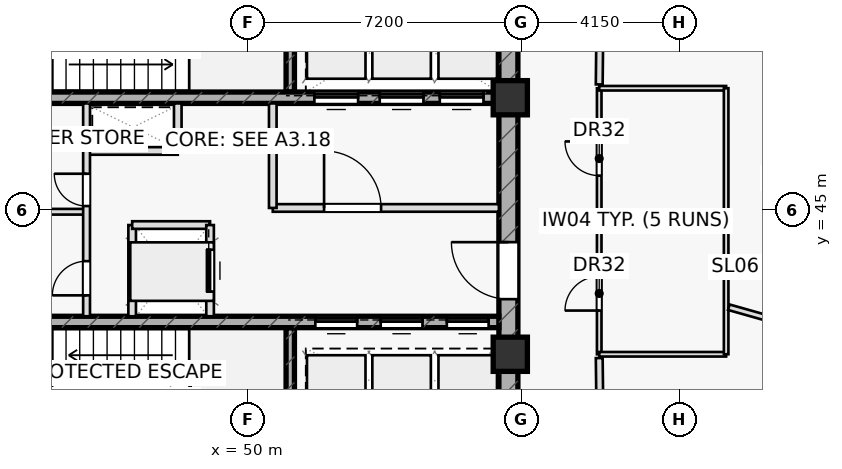
"""IFC4 building model, lengths in metres.
Left out: names, types, materials, properties, quantities, classifications, styles, units other than length and angle.
Written with IfcOpenShell. Run it as: python <this file> out.ifc"""

import sys

from ifc_helpers import new_model, si_unit, direction, frame, frame_2d, origin, origin_2d, place, context, subcontext, project, spatial, rectangle, extrude, element, fill, save


model = new_model("IFC4")
c1 = context("Model", 3, precision=1e-05, world=origin(), true_north=direction((0.0, 1.0)))
c2 = subcontext(c1, "Body", "Model", "MODEL_VIEW")
j1 = project(units=[si_unit("LENGTHUNIT", "METRE"), si_unit("PLANEANGLEUNIT", "RADIAN")], contexts=[c1])
p1 = place(None, origin())
s1 = spatial("IfcSite", under=j1, at=p1, CompositionType="ELEMENT")
p2 = place(p1, origin())
s2 = spatial("IfcBuilding", under=s1, at=p2, CompositionType="ELEMENT")
p3 = place(p2, frame((0.0, 0.0, 184.9)))
s3 = spatial("IfcBuildingStorey", under=s2, at=p3, CompositionType="ELEMENT", Elevation=184.9)
for number, where, z_axis, x_axis in (
    (1, (51.11, 48.1, 0.0), (0.0, 0.0, 1.0), (0.0, 1.0, 0.0)),
    (2, (51.11, 38.8, 0.0), (0.0, 0.0, 1.0), (0.0, 1.0, 0.0)),
):
    element("IfcWall", number, at=place(p3, frame(where, z_axis=z_axis, x_axis=x_axis)), inside=s3, PredefinedType="SHEAR", context=c2, shape_type="SweptSolid", body=[
        extrude(rectangle(XDim=3.1, YDim=0.22, at=frame_2d((1.55, 0.0))), origin(), (0.0, 0.0, 1.0), 3.55),
    ])
p4 = place(p3, frame((56.85, 38.8, 0.0), z_axis=(0.0, 0.0, 1.0), x_axis=(0.0, 1.0, 0.0)))
e3 = element("IfcWall", 3, at=p4, inside=s3, PredefinedType="SHEAR", context=c2, shape_type="SweptSolid", body=[
    extrude(rectangle(XDim=12.4, YDim=0.5, at=frame_2d((6.2, 0.0))), origin(), (0.0, 0.0, 1.0), 3.55),
])
p5 = place(p4, frame((3.85, 0.0, 0.0)))
e4 = element("IfcOpeningElement", 4, at=p5, cuts=e3, PredefinedType="OPENING", context=c2, shape_type="SweptSolid", body=[
    extrude(rectangle(XDim=1.5, YDim=2.2, at=frame_2d((0.75, 1.1))), frame((0.0, 0.26, 0.0), z_axis=(0.0, -1.0, 0.0), x_axis=(1.0, 0.0, 0.0)), (0.0, 0.0, 1.0), 0.52),
])
p6 = place(p3, frame((43.4, 47.95, 0.0), z_axis=(0.0, 0.0, 1.0), x_axis=(1.0, 0.0, 0.0)))
e5 = element("IfcWall", 5, at=p6, inside=s3, PredefinedType="SHEAR", context=c2, shape_type="SweptSolid", body=[
    extrude(rectangle(XDim=13.2, YDim=0.3, at=frame_2d((6.6, 0.0))), origin(), (0.0, 0.0, 1.0), 3.55),
])
p7 = place(p6, frame((8.345, 0.0, 0.0)))
e6 = element("IfcOpeningElement", 6, at=p7, cuts=e5, PredefinedType="OPENING", context=c2, shape_type="SweptSolid", body=[
    extrude(rectangle(XDim=1.15, YDim=2.2, at=frame_2d((0.575, 1.1))), frame((0.0, 0.16, 0.0), z_axis=(0.0, -1.0, 0.0), x_axis=(1.0, 0.0, 0.0)), (0.0, 0.0, 1.0), 0.32),
])
p8 = place(p6, frame((10.065, 0.0, 0.0)))
e7 = element("IfcOpeningElement", 7, at=p8, cuts=e5, PredefinedType="OPENING", context=c2, shape_type="SweptSolid", body=[
    extrude(rectangle(XDim=1.15, YDim=2.2, at=frame_2d((0.575, 1.1))), frame((0.0, 0.16, 0.0), z_axis=(0.0, -1.0, 0.0), x_axis=(1.0, 0.0, 0.0)), (0.0, 0.0, 1.0), 0.32),
])
p9 = place(p6, frame((11.645, 0.0, 0.0)))
e8 = element("IfcOpeningElement", 8, at=p9, cuts=e5, PredefinedType="OPENING", context=c2, shape_type="SweptSolid", body=[
    extrude(rectangle(XDim=1.15, YDim=2.2, at=frame_2d((0.575, 1.1))), frame((0.0, 0.16, 0.0), z_axis=(0.0, -1.0, 0.0), x_axis=(1.0, 0.0, 0.0)), (0.0, 0.0, 1.0), 0.32),
])
p10 = place(p3, frame((43.4, 42.05, 0.0), z_axis=(0.0, 0.0, 1.0), x_axis=(1.0, 0.0, 0.0)))
e9 = element("IfcWall", 9, at=p10, inside=s3, PredefinedType="SHEAR", context=c2, shape_type="SweptSolid", body=[
    extrude(rectangle(XDim=13.2, YDim=0.3, at=frame_2d((6.6, 0.0))), origin(), (0.0, 0.0, 1.0), 3.55),
])
p11 = place(p10, frame((8.37, 0.0, 0.0)))
e10 = element("IfcOpeningElement", 10, at=p11, cuts=e9, PredefinedType="OPENING", context=c2, shape_type="SweptSolid", body=[
    extrude(rectangle(XDim=1.1, YDim=2.15, at=frame_2d((0.55, 1.075))), frame((0.0, 0.16, 0.0), z_axis=(0.0, -1.0, 0.0), x_axis=(1.0, 0.0, 0.0)), (0.0, 0.0, 1.0), 0.32),
])
p12 = place(p10, frame((10.09, 0.0, 0.0)))
e11 = element("IfcOpeningElement", 11, at=p12, cuts=e9, PredefinedType="OPENING", context=c2, shape_type="SweptSolid", body=[
    extrude(rectangle(XDim=1.1, YDim=2.15, at=frame_2d((0.55, 1.075))), frame((0.0, 0.16, 0.0), z_axis=(0.0, -1.0, 0.0), x_axis=(1.0, 0.0, 0.0)), (0.0, 0.0, 1.0), 0.32),
])
p13 = place(p10, frame((11.83, 0.0, 0.0)))
e12 = element("IfcOpeningElement", 12, at=p13, cuts=e9, PredefinedType="OPENING", context=c2, shape_type="SweptSolid", body=[
    extrude(rectangle(XDim=1.1, YDim=2.15, at=frame_2d((0.55, 1.075))), frame((0.0, 0.16, 0.0), z_axis=(0.0, -1.0, 0.0), x_axis=(1.0, 0.0, 0.0)), (0.0, 0.0, 1.0), 0.32),
])
for number, where, z_axis, x_axis in (
    (13, (56.9, 47.95, 0.0), (0.0, 0.0, 1.0), (1.0, 0.0, 0.0)),
    (14, (56.9, 41.2, 0.0), (0.0, 0.0, 1.0), (1.0, 0.0, 0.0)),
):
    element("IfcColumn", number, at=place(p3, frame(where, z_axis=z_axis, x_axis=x_axis)), inside=s3, PredefinedType="COLUMN", context=c2, shape_type="SweptSolid", body=[
        extrude(rectangle(XDim=0.9, YDim=0.9, at=origin_2d()), origin(), (0.0, 0.0, 1.0), 3.55),
    ])
p14 = place(p3, frame((45.75, 46.55, 0.0), z_axis=(0.0, 0.0, 1.0), x_axis=(1.0, 0.0, 0.0)))
e15 = element("IfcWall", 15, at=p14, inside=s3, PredefinedType="PARTITIONING", context=c2, shape_type="SweptSolid", body=[
    extrude(rectangle(XDim=2.4, YDim=0.2, at=frame_2d((1.2, 0.0))), origin(), (0.0, 0.0, 1.0), 3.55),
])
p15 = place(p3, frame((48.15, 46.55, 0.0), z_axis=(0.0, 0.0, 1.0), x_axis=(0.0, 1.0, 0.0)))
e16 = element("IfcWall", 16, at=p15, inside=s3, PredefinedType="PARTITIONING", context=c2, shape_type="SweptSolid", body=[
    extrude(rectangle(XDim=1.25, YDim=0.2, at=frame_2d((0.625, 0.0))), origin(), (0.0, 0.0, 1.0), 3.55),
])
p16 = place(p3, frame((46.95, 42.2, 0.0), z_axis=(0.0, 0.0, 1.0), x_axis=(0.0, 1.0, 0.0)))
e17 = element("IfcWall", 17, at=p16, inside=s3, PredefinedType="PARTITIONING", context=c2, shape_type="SweptSolid", body=[
    extrude(rectangle(XDim=2.4, YDim=0.2, at=frame_2d((1.2, 0.0))), origin(), (0.0, 0.0, 1.0), 3.55),
])
p17 = place(p3, frame((46.95, 44.6, 0.0), z_axis=(0.0, 0.0, 1.0), x_axis=(1.0, 0.0, 0.0)))
e18 = element("IfcWall", 18, at=p17, inside=s3, PredefinedType="PARTITIONING", context=c2, shape_type="SweptSolid", body=[
    extrude(rectangle(XDim=2.05, YDim=0.2, at=frame_2d((1.025, 0.0))), origin(), (0.0, 0.0, 1.0), 3.55),
])
p18 = place(p3, frame((50.65, 45.05, 0.0), z_axis=(0.0, 0.0, 1.0), x_axis=(1.0, 0.0, 0.0)))
e19 = element("IfcWall", 19, at=p18, inside=s3, PredefinedType="PARTITIONING", context=c2, shape_type="SweptSolid", body=[
    extrude(rectangle(XDim=5.95, YDim=0.2, at=frame_2d((2.975, 0.0))), origin(), (0.0, 0.0, 1.0), 3.55),
])
p19 = place(p18, frame((1.35, 0.0, 0.0)))
e20 = element("IfcOpeningElement", 20, at=p19, cuts=e19, PredefinedType="OPENING", context=c2, shape_type="SweptSolid", body=[
    extrude(rectangle(XDim=1.5, YDim=2.2, at=frame_2d((0.75, 1.1))), frame((0.0, 0.11, 0.0), z_axis=(0.0, -1.0, 0.0), x_axis=(1.0, 0.0, 0.0)), (0.0, 0.0, 1.0), 0.22),
])
p20 = place(p3, frame((50.65, 45.05, 0.0), z_axis=(0.0, 0.0, 1.0), x_axis=(0.0, 1.0, 0.0)))
e21 = element("IfcWall", 21, at=p20, inside=s3, PredefinedType="PARTITIONING", context=c2, shape_type="SweptSolid", body=[
    extrude(rectangle(XDim=2.75, YDim=0.2, at=frame_2d((1.375, 0.0))), origin(), (0.0, 0.0, 1.0), 3.55),
])
p21 = place(p3, frame((43.4, 44.95, 0.0), z_axis=(0.0, 0.0, 1.0), x_axis=(1.0, 0.0, 0.0)))
e22 = element("IfcWall", 22, at=p21, inside=s3, PredefinedType="PARTITIONING", context=c2, shape_type="SweptSolid", body=[
    extrude(rectangle(XDim=2.35, YDim=0.15, at=frame_2d((1.175, 0.0))), origin(), (0.0, 0.0, 1.0), 3.55),
])
p22 = place(p3, frame((45.75, 42.2, 0.0), z_axis=(0.0, 0.0, 1.0), x_axis=(0.0, 1.0, 0.0)))
e23 = element("IfcWall", 23, at=p22, inside=s3, PredefinedType="PARTITIONING", context=c2, shape_type="SweptSolid", body=[
    extrude(rectangle(XDim=5.6, YDim=0.18, at=frame_2d((2.8, 0.0))), origin(), (0.0, 0.0, 1.0), 3.55),
])
p23 = place(p22, frame((0.55, 0.0, 0.0)))
e24 = element("IfcOpeningElement", 24, at=p23, cuts=e23, PredefinedType="OPENING", context=c2, shape_type="SweptSolid", body=[
    extrude(rectangle(XDim=0.9, YDim=2.05, at=frame_2d((0.45, 1.025))), frame((0.0, 0.1, 0.0), z_axis=(0.0, -1.0, 0.0), x_axis=(1.0, 0.0, 0.0)), (0.0, 0.0, 1.0), 0.2),
])
p24 = place(p22, frame((2.9, 0.0, 0.0)))
e25 = element("IfcOpeningElement", 25, at=p24, cuts=e23, PredefinedType="OPENING", context=c2, shape_type="SweptSolid", body=[
    extrude(rectangle(XDim=0.85, YDim=2.05, at=frame_2d((0.425, 1.025))), frame((0.0, 0.1, 0.0), z_axis=(0.0, -1.0, 0.0), x_axis=(1.0, 0.0, 0.0)), (0.0, 0.0, 1.0), 0.2),
])
p25 = place(p3, frame((59.24, 41.2, 0.0), z_axis=(0.0, 0.0, 1.0), x_axis=(0.0, 1.0, 0.0)))
e26 = element("IfcWall", 26, at=p25, inside=s3, PredefinedType="PARTITIONING", context=c2, shape_type="SweptSolid", body=[
    extrude(rectangle(XDim=7.0, YDim=0.12, at=frame_2d((3.5, 0.0))), origin(), (0.0, 0.0, 1.0), 3.55),
])
p26 = place(p25, frame((1.15, 0.0, 0.0)))
e27 = element("IfcOpeningElement", 27, at=p26, cuts=e26, PredefinedType="OPENING", context=c2, shape_type="SweptSolid", body=[
    extrude(rectangle(XDim=0.9, YDim=2.05, at=frame_2d((0.45, 1.025))), frame((0.0, 0.07, 0.0), z_axis=(0.0, -1.0, 0.0), x_axis=(1.0, 0.0, 0.0)), (0.0, 0.0, 1.0), 0.14),
])
p27 = place(p25, frame((4.7, 0.0, 0.0)))
e28 = element("IfcOpeningElement", 28, at=p27, cuts=e26, PredefinedType="OPENING", context=c2, shape_type="SweptSolid", body=[
    extrude(rectangle(XDim=0.9, YDim=2.05, at=frame_2d((0.45, 1.025))), frame((0.0, 0.07, 0.0), z_axis=(0.0, -1.0, 0.0), x_axis=(1.0, 0.0, 0.0)), (0.0, 0.0, 1.0), 0.14),
])
for number, where, z_axis, x_axis in (
    (29, (59.24, 41.2, 0.0), (0.0, 0.0, 1.0), (1.0, 0.0, 0.0)),
    (30, (59.24, 44.65, 0.0), (0.0, 0.0, 1.0), (1.0, 0.0, 0.0)),
    (31, (59.24, 48.2, 0.0), (0.0, 0.0, 1.0), (1.0, 0.0, 0.0)),
):
    element("IfcWall", number, at=place(p3, frame(where, z_axis=z_axis, x_axis=x_axis)), inside=s3, PredefinedType="PARTITIONING", context=c2, shape_type="SweptSolid", body=[
        extrude(rectangle(XDim=3.34, YDim=0.12, at=frame_2d((1.67, 0.0))), origin(), (0.0, 0.0, 1.0), 3.55),
    ])
p28 = place(p3, frame((62.58, 41.2, 0.0), z_axis=(0.0, 0.0, 1.0), x_axis=(0.0, 1.0, 0.0)))
e32 = element("IfcWall", 32, at=p28, inside=s3, PredefinedType="PARTITIONING", context=c2, shape_type="SweptSolid", body=[
    extrude(rectangle(XDim=7.0, YDim=0.12, at=frame_2d((3.5, 0.0))), origin(), (0.0, 0.0, 1.0), 3.55),
])
p29 = place(p3, frame((62.65, 42.438, 0.0), z_axis=(0.0, 0.0, 1.0), x_axis=(0.962191299286, -0.272374564852, 0.0)))
e33 = element("IfcWall", 33, at=p29, inside=s3, PredefinedType="PARTITIONING", context=c2, shape_type="SweptSolid", body=[
    extrude(rectangle(XDim=14.571, YDim=0.15, at=frame_2d((7.286, 0.0))), origin(), (0.0, 0.0, 1.0), 2.935),
])
p30 = place(p3, frame((59.301, 53.95, 0.0), z_axis=(0.0, 0.0, 1.0), x_axis=(-0.010629422803, -0.99994350609, 0.0)))
e34 = element("IfcWall", 34, at=p30, inside=s3, PredefinedType="PARTITIONING", context=c2, shape_type="SweptSolid", body=[
    extrude(rectangle(XDim=5.65, YDim=0.18, at=frame_2d((2.825, 0.0))), origin(), (0.0, 0.0, 1.0), 2.935),
])
p31 = place(p30, frame((2.716, 0.0, 0.0)))
e35 = element("IfcOpeningElement", 35, at=p31, cuts=e34, PredefinedType="OPENING", context=c2, shape_type="SweptSolid", body=[
    extrude(rectangle(XDim=0.95, YDim=2.05, at=frame_2d((0.475, 1.025))), frame((0.0, 0.1, 0.0), z_axis=(0.0, -1.0, 0.0), x_axis=(1.0, 0.0, 0.0)), (0.0, 0.0, 1.0), 0.2),
])
p32 = place(p3, frame((59.24, 41.1, 0.0), z_axis=(0.0, 0.0, 1.0), x_axis=(0.011891834917, -0.999929289631, 0.0)))
e36 = element("IfcWall", 36, at=p32, inside=s3, PredefinedType="PARTITIONING", context=c2, shape_type="SweptSolid", body=[
    extrude(rectangle(XDim=5.05, YDim=0.18, at=frame_2d((2.525, 0.0))), origin(), (0.0, 0.0, 1.0), 2.935),
])
p33 = place(p32, frame((1.305, 0.0, 0.0)))
e37 = element("IfcOpeningElement", 37, at=p33, cuts=e36, PredefinedType="OPENING", context=c2, shape_type="SweptSolid", body=[
    extrude(rectangle(XDim=0.95, YDim=2.05, at=frame_2d((0.475, 1.025))), frame((0.0, 0.1, 0.0), z_axis=(0.0, -1.0, 0.0), x_axis=(1.0, 0.0, 0.0)), (0.0, 0.0, 1.0), 0.2),
])
p34 = place(p3, frame((49.0, 42.2, 0.0), z_axis=(0.0, 0.0, 1.0), x_axis=(0.0, 1.0, 0.0)))
e38 = element("IfcWall", 38, at=p34, inside=s3, PredefinedType="PARTITIONING", context=c2, shape_type="SweptSolid", body=[
    extrude(rectangle(XDim=2.4, YDim=0.2, at=frame_2d((1.2, 0.0))), origin(), (0.0, 0.0, 1.0), 3.55),
])
p35 = place(p34, frame((0.65, 0.0, 0.0)))
e39 = element("IfcOpeningElement", 39, at=p35, cuts=e38, PredefinedType="OPENING", context=c2, shape_type="SweptSolid", body=[
    extrude(rectangle(XDim=1.1, YDim=2.15, at=frame_2d((0.55, 1.075))), frame((0.0, 0.11, 0.0), z_axis=(0.0, -1.0, 0.0), x_axis=(1.0, 0.0, 0.0)), (0.0, 0.0, 1.0), 0.22),
])
p36 = place(p5, origin())
e40 = element("IfcDoor", 40, at=p36, inside=s3, OperationType="SINGLE_SWING_RIGHT", PredefinedType="DOOR", context=c2, shape_type="SweptSolid", body=[
    extrude(rectangle(XDim=1.5, YDim=2.2, at=frame_2d((0.75, 1.1))), frame((0.0, 0.025, 0.0), z_axis=(0.0, -1.0, 0.0), x_axis=(1.0, 0.0, 0.0)), (0.0, 0.0, 1.0), 0.05),
])
fill(e4, e40)
p37 = place(p19, origin())
e41 = element("IfcDoor", 41, at=p37, inside=s3, OperationType="SINGLE_SWING_LEFT", PredefinedType="DOOR", context=c2, shape_type="SweptSolid", body=[
    extrude(rectangle(XDim=1.5, YDim=2.2, at=frame_2d((0.75, 1.1))), frame((0.0, 0.025, 0.0), z_axis=(0.0, -1.0, 0.0), x_axis=(1.0, 0.0, 0.0)), (0.0, 0.0, 1.0), 0.05),
])
fill(e20, e41)
p38 = place(p23, origin())
e42 = element("IfcDoor", 42, at=p38, inside=s3, OperationType="SINGLE_SWING_LEFT", PredefinedType="DOOR", context=c2, shape_type="SweptSolid", body=[
    extrude(rectangle(XDim=0.9, YDim=2.05, at=frame_2d((0.45, 1.025))), frame((0.0, 0.025, 0.0), z_axis=(0.0, -1.0, 0.0), x_axis=(1.0, 0.0, 0.0)), (0.0, 0.0, 1.0), 0.05),
])
fill(e24, e42)
p39 = place(p24, origin())
e43 = element("IfcDoor", 43, at=p39, inside=s3, OperationType="SINGLE_SWING_RIGHT", PredefinedType="DOOR", context=c2, shape_type="SweptSolid", body=[
    extrude(rectangle(XDim=0.85, YDim=2.05, at=frame_2d((0.425, 1.025))), frame((0.0, 0.025, 0.0), z_axis=(0.0, -1.0, 0.0), x_axis=(1.0, 0.0, 0.0)), (0.0, 0.0, 1.0), 0.05),
])
fill(e25, e43)
p40 = place(p26, origin())
e44 = element("IfcDoor", 44, at=p40, inside=s3, OperationType="SINGLE_SWING_LEFT", PredefinedType="DOOR", context=c2, shape_type="SweptSolid", body=[
    extrude(rectangle(XDim=0.9, YDim=2.05, at=frame_2d((0.45, 1.025))), frame((0.0, 0.025, 0.0), z_axis=(0.0, -1.0, 0.0), x_axis=(1.0, 0.0, 0.0)), (0.0, 0.0, 1.0), 0.05),
])
fill(e27, e44)
p41 = place(p27, origin())
e45 = element("IfcDoor", 45, at=p41, inside=s3, OperationType="SINGLE_SWING_RIGHT", PredefinedType="DOOR", context=c2, shape_type="SweptSolid", body=[
    extrude(rectangle(XDim=0.9, YDim=2.05, at=frame_2d((0.45, 1.025))), frame((0.0, 0.025, 0.0), z_axis=(0.0, -1.0, 0.0), x_axis=(1.0, 0.0, 0.0)), (0.0, 0.0, 1.0), 0.05),
])
fill(e28, e45)
p42 = place(p7, origin())
e46 = element("IfcDoor", 46, at=p42, inside=s3, OperationType="SLIDING_TO_LEFT", PredefinedType="DOOR", context=c2, shape_type="SweptSolid", body=[
    extrude(rectangle(XDim=1.15, YDim=2.2, at=frame_2d((0.575, 1.1))), frame((0.0, 0.025, 0.0), z_axis=(0.0, -1.0, 0.0), x_axis=(1.0, 0.0, 0.0)), (0.0, 0.0, 1.0), 0.05),
])
fill(e6, e46)
p43 = place(p8, origin())
e47 = element("IfcDoor", 47, at=p43, inside=s3, OperationType="SLIDING_TO_LEFT", PredefinedType="DOOR", context=c2, shape_type="SweptSolid", body=[
    extrude(rectangle(XDim=1.15, YDim=2.2, at=frame_2d((0.575, 1.1))), frame((0.0, 0.025, 0.0), z_axis=(0.0, -1.0, 0.0), x_axis=(1.0, 0.0, 0.0)), (0.0, 0.0, 1.0), 0.05),
])
fill(e7, e47)
p44 = place(p9, origin())
e48 = element("IfcDoor", 48, at=p44, inside=s3, OperationType="SLIDING_TO_LEFT", PredefinedType="DOOR", context=c2, shape_type="SweptSolid", body=[
    extrude(rectangle(XDim=1.15, YDim=2.2, at=frame_2d((0.575, 1.1))), frame((0.0, 0.025, 0.0), z_axis=(0.0, -1.0, 0.0), x_axis=(1.0, 0.0, 0.0)), (0.0, 0.0, 1.0), 0.05),
])
fill(e8, e48)
p45 = place(p11, origin())
e49 = element("IfcDoor", 49, at=p45, inside=s3, OperationType="SLIDING_TO_LEFT", PredefinedType="DOOR", context=c2, shape_type="SweptSolid", body=[
    extrude(rectangle(XDim=1.1, YDim=2.15, at=frame_2d((0.55, 1.075))), frame((0.0, 0.025, 0.0), z_axis=(0.0, -1.0, 0.0), x_axis=(1.0, 0.0, 0.0)), (0.0, 0.0, 1.0), 0.05),
])
fill(e10, e49)
p46 = place(p12, origin())
e50 = element("IfcDoor", 50, at=p46, inside=s3, OperationType="SLIDING_TO_LEFT", PredefinedType="DOOR", context=c2, shape_type="SweptSolid", body=[
    extrude(rectangle(XDim=1.1, YDim=2.15, at=frame_2d((0.55, 1.075))), frame((0.0, 0.025, 0.0), z_axis=(0.0, -1.0, 0.0), x_axis=(1.0, 0.0, 0.0)), (0.0, 0.0, 1.0), 0.05),
])
fill(e11, e50)
p47 = place(p13, origin())
e51 = element("IfcDoor", 51, at=p47, inside=s3, OperationType="SLIDING_TO_LEFT", PredefinedType="DOOR", context=c2, shape_type="SweptSolid", body=[
    extrude(rectangle(XDim=1.1, YDim=2.15, at=frame_2d((0.55, 1.075))), frame((0.0, 0.025, 0.0), z_axis=(0.0, -1.0, 0.0), x_axis=(1.0, 0.0, 0.0)), (0.0, 0.0, 1.0), 0.05),
])
fill(e12, e51)
p48 = place(p35, origin())
e52 = element("IfcDoor", 52, at=p48, inside=s3, OperationType="SLIDING_TO_RIGHT", PredefinedType="DOOR", context=c2, shape_type="SweptSolid", body=[
    extrude(rectangle(XDim=1.1, YDim=2.15, at=frame_2d((0.55, 1.075))), frame((0.0, 0.025, 0.0), z_axis=(0.0, -1.0, 0.0), x_axis=(1.0, 0.0, 0.0)), (0.0, 0.0, 1.0), 0.05),
])
fill(e39, e52)
save(model, sys.argv[1])
